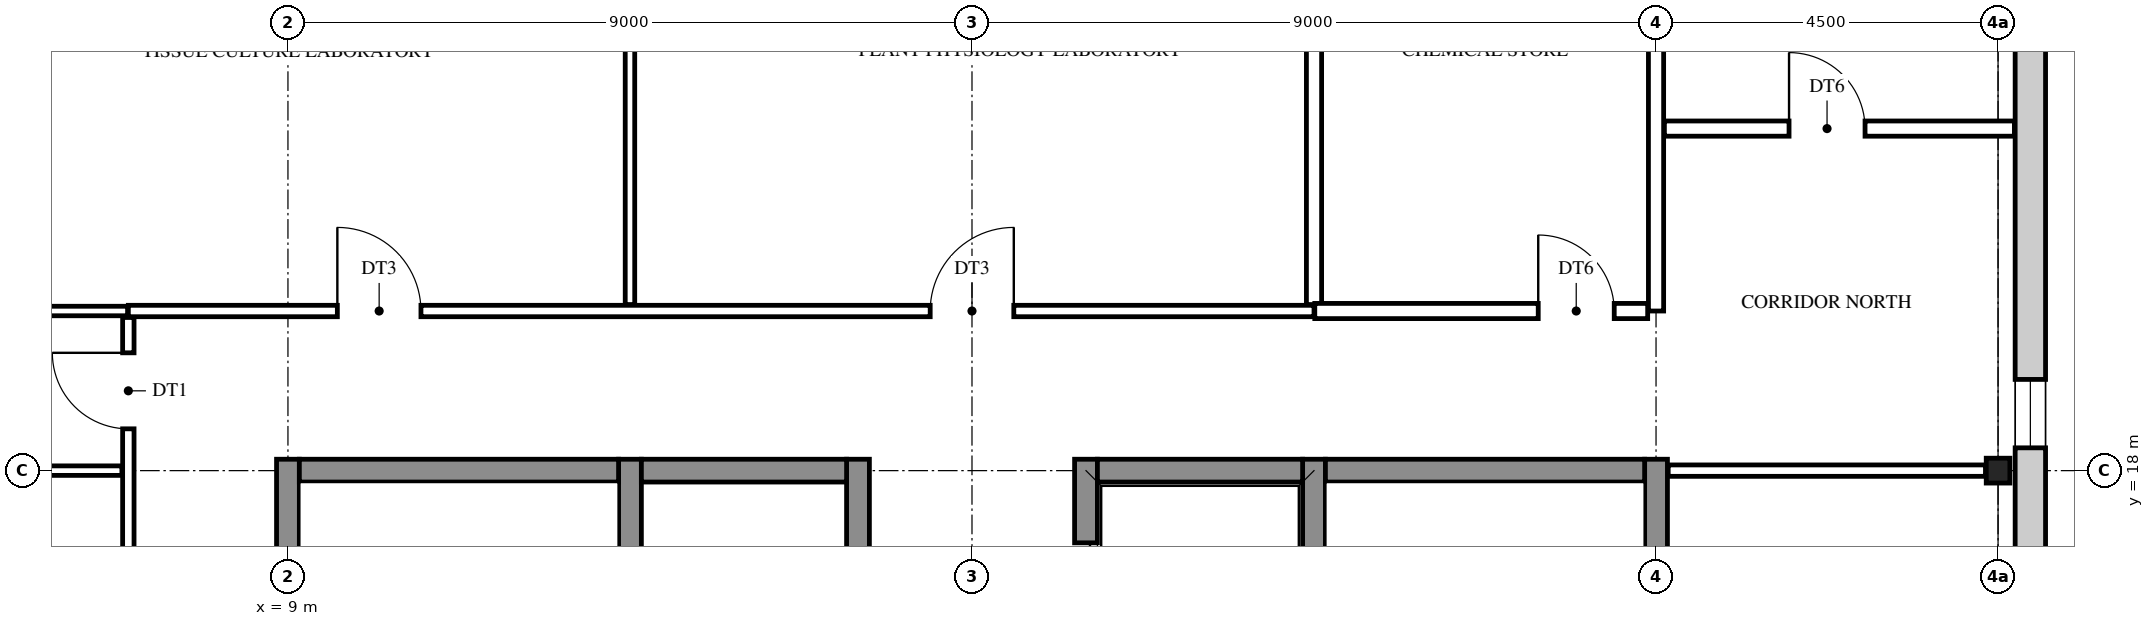
"""IFC4 building model, lengths in metres.
Left out: names, types, materials, properties, quantities, classifications, styles, units other than length and angle.
Written with IfcOpenShell. Run it as: python <this file> out.ifc"""

import sys

from ifc_helpers import new_model, si_unit, direction, frame, frame_2d, origin, origin_2d, place, context, subcontext, project, spatial, rectangle, i_section, extrude, element, fill, save


model = new_model("IFC4")
c1 = context("Model", 3, precision=1e-05, world=origin(), true_north=direction((0.0, 1.0)))
c2 = subcontext(c1, "Body", "Model", "MODEL_VIEW")
j1 = project(units=[si_unit("LENGTHUNIT", "METRE"), si_unit("PLANEANGLEUNIT", "RADIAN")], contexts=[c1])
p1 = place(None, origin())
s1 = spatial("IfcSite", under=j1, at=p1, CompositionType="ELEMENT")
p2 = place(p1, origin())
s2 = spatial("IfcBuilding", under=s1, at=p2, CompositionType="ELEMENT")
p3 = place(p2, frame((0.0, 0.0, 31.8)))
s3 = spatial("IfcBuildingStorey", under=s2, at=p3, CompositionType="ELEMENT", Elevation=31.8)
p4 = place(p3, frame((31.5, 18.0, 0.0), z_axis=(0.0, 0.0, 1.0), x_axis=(1.0, 0.0, 0.0)))
e1 = element("IfcColumn", 1, at=p4, inside=s3, PredefinedType="COLUMN", context=c2, shape_type="SweptSolid", body=[
    extrude(i_section(OverallWidth=0.311, OverallDepth=0.327, WebThickness=0.016, FlangeThickness=0.025, FilletRadius=0.017, at=origin_2d()), origin(), (0.0, 0.0, 1.0), 4.2),
])
for number, where, z_axis, x_axis in (
    (2, (9.0, 8.85, 0.0), (0.0, 0.0, 1.0), (0.0, 1.0, 0.0)),
    (3, (13.5, 8.85, 0.0), (0.0, 0.0, 1.0), (0.0, 1.0, 0.0)),
):
    element("IfcWall", number, at=place(p3, frame(where, z_axis=z_axis, x_axis=x_axis)), inside=s3, PredefinedType="SHEAR", context=c2, shape_type="SweptSolid", body=[
        extrude(rectangle(XDim=9.3, YDim=0.3, at=frame_2d((4.65, 0.0))), origin(), (0.0, 0.0, 1.0), 4.2),
    ])
p5 = place(p3, frame((16.5, 8.85, 0.0), z_axis=(0.0, 0.0, 1.0), x_axis=(0.0, 1.0, 0.0)))
e4 = element("IfcWall", 4, at=p5, inside=s3, PredefinedType="SHEAR", context=c2, shape_type="SweptSolid", body=[
    extrude(rectangle(XDim=9.3, YDim=0.3, at=frame_2d((4.65, 0.0))), origin(), (0.0, 0.0, 1.0), 4.2),
])
p6 = place(p5, frame((1.1, 0.0, 0.0)))
e5 = element("IfcOpeningElement", 5, at=p6, cuts=e4, PredefinedType="OPENING", context=c2, shape_type="SweptSolid", body=[
    extrude(rectangle(XDim=1.1, YDim=2.1, at=frame_2d((0.55, 1.05))), frame((0.0, 0.16, 0.0), z_axis=(0.0, -1.0, 0.0), x_axis=(1.0, 0.0, 0.0)), (0.0, 0.0, 1.0), 0.32),
])
p7 = place(p5, frame((4.1, 0.0, 0.0)))
e6 = element("IfcOpeningElement", 6, at=p7, cuts=e4, PredefinedType="OPENING", context=c2, shape_type="SweptSolid", body=[
    extrude(rectangle(XDim=1.1, YDim=2.1, at=frame_2d((0.55, 1.05))), frame((0.0, 0.16, 0.0), z_axis=(0.0, -1.0, 0.0), x_axis=(1.0, 0.0, 0.0)), (0.0, 0.0, 1.0), 0.32),
])
p8 = place(p3, frame((19.5, 8.85, 0.0), z_axis=(0.0, 0.0, 1.0), x_axis=(0.0, 1.0, 0.0)))
e7 = element("IfcWall", 7, at=p8, inside=s3, PredefinedType="SHEAR", context=c2, shape_type="SweptSolid", body=[
    extrude(rectangle(XDim=9.3, YDim=0.3, at=frame_2d((4.65, 0.0))), origin(), (0.0, 0.0, 1.0), 4.2),
])
p9 = place(p8, frame((3.95, 0.0, 0.0)))
e8 = element("IfcOpeningElement", 8, at=p9, cuts=e7, PredefinedType="OPENING", context=c2, shape_type="SweptSolid", body=[
    extrude(rectangle(XDim=1.4, YDim=2.1, at=frame_2d((0.7, 1.05))), frame((0.0, 0.16, 0.0), z_axis=(0.0, -1.0, 0.0), x_axis=(1.0, 0.0, 0.0)), (0.0, 0.0, 1.0), 0.32),
])
p10 = place(p8, frame((7.1, 0.0, 0.0)))
e9 = element("IfcOpeningElement", 9, at=p10, cuts=e7, PredefinedType="OPENING", context=c2, shape_type="SweptSolid", body=[
    extrude(rectangle(XDim=1.1, YDim=2.1, at=frame_2d((0.55, 1.05))), frame((0.0, 0.16, 0.0), z_axis=(0.0, -1.0, 0.0), x_axis=(1.0, 0.0, 0.0)), (0.0, 0.0, 1.0), 0.32),
])
for number, where, z_axis, x_axis in (
    (10, (22.5, 8.85, 0.0), (0.0, 0.0, 1.0), (0.0, 1.0, 0.0)),
    (11, (27.0, 8.85, 0.0), (0.0, 0.0, 1.0), (0.0, 1.0, 0.0)),
):
    element("IfcWall", number, at=place(p3, frame(where, z_axis=z_axis, x_axis=x_axis)), inside=s3, PredefinedType="SHEAR", context=c2, shape_type="SweptSolid", body=[
        extrude(rectangle(XDim=9.3, YDim=0.3, at=frame_2d((4.65, 0.0))), origin(), (0.0, 0.0, 1.0), 4.2),
    ])
p11 = place(p3, frame((9.15, 18.0, 0.0), z_axis=(0.0, 0.0, 1.0), x_axis=(1.0, 0.0, 0.0)))
e12 = element("IfcWall", 12, at=p11, inside=s3, PredefinedType="SHEAR", context=c2, shape_type="SweptSolid", body=[
    extrude(rectangle(XDim=4.2, YDim=0.3, at=frame_2d((2.1, 0.0))), origin(), (0.0, 0.0, 1.0), 4.2),
])
for number, where, z_axis, x_axis in (
    (13, (13.65, 18.0, 0.0), (0.0, 0.0, 1.0), (1.0, 0.0, 0.0)),
    (14, (19.65, 18.0, 0.0), (0.0, 0.0, 1.0), (1.0, 0.0, 0.0)),
):
    element("IfcWall", number, at=place(p3, frame(where, z_axis=z_axis, x_axis=x_axis)), inside=s3, PredefinedType="SHEAR", context=c2, shape_type="SweptSolid", body=[
        extrude(rectangle(XDim=2.7, YDim=0.3, at=frame_2d((1.35, 0.0))), origin(), (0.0, 0.0, 1.0), 4.2),
    ])
p12 = place(p3, frame((22.65, 18.0, 0.0), z_axis=(0.0, 0.0, 1.0), x_axis=(1.0, 0.0, 0.0)))
e15 = element("IfcWall", 15, at=p12, inside=s3, PredefinedType="SHEAR", context=c2, shape_type="SweptSolid", body=[
    extrude(rectangle(XDim=4.2, YDim=0.3, at=frame_2d((2.1, 0.0))), origin(), (0.0, 0.0, 1.0), 4.2),
])
p13 = place(p3, frame((31.925, 27.225, 0.0), z_axis=(0.0, 0.0, 1.0), x_axis=(0.0, -1.0, 0.0)))
e16 = element("IfcWall", 16, at=p13, inside=s3, PredefinedType="STANDARD", context=c2, shape_type="SweptSolid", body=[
    extrude(rectangle(XDim=27.45, YDim=0.4, at=frame_2d((13.725, 0.0))), origin(), (0.0, 0.0, 1.0), 4.2),
])
p14 = place(p13, frame((26.025, 0.0, 0.9)))
e17 = element("IfcOpeningElement", 17, at=p14, cuts=e16, PredefinedType="OPENING", context=c2, shape_type="SweptSolid", body=[
    extrude(rectangle(XDim=0.9, YDim=2.0, at=frame_2d((0.45, 1.0))), frame((0.0, 0.21, 0.0), z_axis=(0.0, -1.0, 0.0), x_axis=(1.0, 0.0, 0.0)), (0.0, 0.0, 1.0), 0.42),
])
p15 = place(p13, frame((18.525, 0.0, 0.9)))
e18 = element("IfcOpeningElement", 18, at=p15, cuts=e16, PredefinedType="OPENING", context=c2, shape_type="SweptSolid", body=[
    extrude(rectangle(XDim=0.9, YDim=2.0, at=frame_2d((0.45, 1.0))), frame((0.0, 0.21, 0.0), z_axis=(0.0, -1.0, 0.0), x_axis=(1.0, 0.0, 0.0)), (0.0, 0.0, 1.0), 0.42),
])
p16 = place(p13, frame((15.675, 0.0, 1.6)))
e19 = element("IfcOpeningElement", 19, at=p16, cuts=e16, PredefinedType="OPENING", context=c2, shape_type="SweptSolid", body=[
    extrude(rectangle(XDim=0.6, YDim=0.9, at=frame_2d((0.3, 0.45))), frame((0.0, 0.21, 0.0), z_axis=(0.0, -1.0, 0.0), x_axis=(1.0, 0.0, 0.0)), (0.0, 0.0, 1.0), 0.42),
])
p17 = place(p13, frame((11.175, 0.0, 1.6)))
e20 = element("IfcOpeningElement", 20, at=p17, cuts=e16, PredefinedType="OPENING", context=c2, shape_type="SweptSolid", body=[
    extrude(rectangle(XDim=0.6, YDim=0.9, at=frame_2d((0.3, 0.45))), frame((0.0, 0.21, 0.0), z_axis=(0.0, -1.0, 0.0), x_axis=(1.0, 0.0, 0.0)), (0.0, 0.0, 1.0), 0.42),
])
p18 = place(p13, frame((8.025, 0.0, 0.9)))
e21 = element("IfcOpeningElement", 21, at=p18, cuts=e16, PredefinedType="OPENING", context=c2, shape_type="SweptSolid", body=[
    extrude(rectangle(XDim=0.9, YDim=2.0, at=frame_2d((0.45, 1.0))), frame((0.0, 0.21, 0.0), z_axis=(0.0, -1.0, 0.0), x_axis=(1.0, 0.0, 0.0)), (0.0, 0.0, 1.0), 0.42),
])
p19 = place(p13, frame((0.525, 0.0, 0.9)))
e22 = element("IfcOpeningElement", 22, at=p19, cuts=e16, PredefinedType="OPENING", context=c2, shape_type="SweptSolid", body=[
    extrude(rectangle(XDim=0.9, YDim=2.0, at=frame_2d((0.45, 1.0))), frame((0.0, 0.21, 0.0), z_axis=(0.0, -1.0, 0.0), x_axis=(1.0, 0.0, 0.0)), (0.0, 0.0, 1.0), 0.42),
])
p20 = place(p3, frame((6.9, 6.985, 0.0), z_axis=(0.0, 0.0, 1.0), x_axis=(0.0, 1.0, 0.0)))
e23 = element("IfcWall", 23, at=p20, inside=s3, PredefinedType="PARTITIONING", context=c2, shape_type="SweptSolid", body=[
    extrude(rectangle(XDim=13.03, YDim=0.15, at=frame_2d((6.515, 0.0))), origin(), (0.0, 0.0, 1.0), 3.537),
])
p21 = place(p20, frame((11.565, 0.0, 0.0)))
e24 = element("IfcOpeningElement", 24, at=p21, cuts=e23, PredefinedType="OPENING", context=c2, shape_type="SweptSolid", body=[
    extrude(rectangle(XDim=1.0, YDim=2.1, at=frame_2d((0.5, 1.05))), frame((0.0, 0.085, 0.0), z_axis=(0.0, -1.0, 0.0), x_axis=(1.0, 0.0, 0.0)), (0.0, 0.0, 1.0), 0.17),
])
p22 = place(p20, frame((5.965, 0.0, 0.0)))
e25 = element("IfcOpeningElement", 25, at=p22, cuts=e23, PredefinedType="OPENING", context=c2, shape_type="SweptSolid", body=[
    extrude(rectangle(XDim=1.1, YDim=2.1, at=frame_2d((0.55, 1.05))), frame((0.0, 0.085, 0.0), z_axis=(0.0, -1.0, 0.0), x_axis=(1.0, 0.0, 0.0)), (0.0, 0.0, 1.0), 0.17),
])
p23 = place(p3, frame((13.5, 20.185, 0.0), z_axis=(0.0, 0.0, 1.0), x_axis=(0.0, 1.0, 0.0)))
e26 = element("IfcWall", 26, at=p23, inside=s3, PredefinedType="PARTITIONING", context=c2, shape_type="SweptSolid", body=[
    extrude(rectangle(XDim=7.041, YDim=0.125, at=frame_2d((3.521, 0.0))), origin(), (0.0, 0.0, 1.0), 3.537),
])
p24 = place(p3, frame((22.5, 20.185, 0.0), z_axis=(0.0, 0.0, 1.0), x_axis=(0.0, 1.0, 0.0)))
e27 = element("IfcWall", 27, at=p24, inside=s3, PredefinedType="PARTITIONING", context=c2, shape_type="SweptSolid", body=[
    extrude(rectangle(XDim=7.041, YDim=0.2, at=frame_2d((3.521, 0.0))), origin(), (0.0, 0.0, 1.0), 3.537),
])
p25 = place(p3, frame((27.0, 20.1, 0.0), z_axis=(0.0, 0.0, 1.0), x_axis=(0.0, 1.0, 0.0)))
e28 = element("IfcWall", 28, at=p25, inside=s3, PredefinedType="PARTITIONING", context=c2, shape_type="SweptSolid", body=[
    extrude(rectangle(XDim=6.726, YDim=0.2, at=frame_2d((3.363, 0.0))), origin(), (0.0, 0.0, 1.0), 3.537),
])
p26 = place(p3, frame((0.166, 18.0, 0.0), z_axis=(0.0, 0.0, 1.0), x_axis=(1.0, 0.0, 0.0)))
e29 = element("IfcWall", 29, at=p26, inside=s3, PredefinedType="PARTITIONING", context=c2, shape_type="SweptSolid", body=[
    extrude(rectangle(XDim=6.649, YDim=0.125, at=frame_2d((3.325, 0.0))), origin(), (0.0, 0.0, 1.0), 3.537),
])
p27 = place(p3, frame((27.16, 18.0, 0.0), z_axis=(0.0, 0.0, 1.0), x_axis=(1.0, 0.0, 0.0)))
e30 = element("IfcWall", 30, at=p27, inside=s3, PredefinedType="PARTITIONING", context=c2, shape_type="SweptSolid", body=[
    extrude(rectangle(XDim=4.175, YDim=0.15, at=frame_2d((2.087, 0.0))), origin(), (0.0, 0.0, 1.0), 3.537),
])
p28 = place(p3, frame((4.573, 20.1, 0.0), z_axis=(0.0, 0.0, 1.0), x_axis=(1.0, 0.0, 0.0)))
e31 = element("IfcWall", 31, at=p28, inside=s3, PredefinedType="PARTITIONING", context=c2, shape_type="SweptSolid", body=[
    extrude(rectangle(XDim=2.317, YDim=0.125, at=frame_2d((1.159, 0.0))), origin(), (0.0, 0.0, 1.0), 3.537),
])
p29 = place(p3, frame((6.9, 20.1, 0.0), z_axis=(0.0, 0.0, 1.0), x_axis=(1.0, 0.0, 0.0)))
e32 = element("IfcWall", 32, at=p29, inside=s3, PredefinedType="PARTITIONING", context=c2, shape_type="SweptSolid", body=[
    extrude(rectangle(XDim=15.6, YDim=0.15, at=frame_2d((7.8, 0.0))), origin(), (0.0, 0.0, 1.0), 3.537),
])
p30 = place(p29, frame((2.75, 0.0, 0.0)))
e33 = element("IfcOpeningElement", 33, at=p30, cuts=e32, PredefinedType="OPENING", context=c2, shape_type="SweptSolid", body=[
    extrude(rectangle(XDim=1.1, YDim=2.1, at=frame_2d((0.55, 1.05))), frame((0.0, 0.085, 0.0), z_axis=(0.0, -1.0, 0.0), x_axis=(1.0, 0.0, 0.0)), (0.0, 0.0, 1.0), 0.17),
])
p31 = place(p29, frame((10.55, 0.0, 0.0)))
e34 = element("IfcOpeningElement", 34, at=p31, cuts=e32, PredefinedType="OPENING", context=c2, shape_type="SweptSolid", body=[
    extrude(rectangle(XDim=1.1, YDim=2.1, at=frame_2d((0.55, 1.05))), frame((0.0, 0.085, 0.0), z_axis=(0.0, -1.0, 0.0), x_axis=(1.0, 0.0, 0.0)), (0.0, 0.0, 1.0), 0.17),
])
p32 = place(p3, frame((22.51, 20.1, 0.0), z_axis=(0.0, 0.0, 1.0), x_axis=(1.0, 0.0, 0.0)))
e35 = element("IfcWall", 35, at=p32, inside=s3, PredefinedType="PARTITIONING", context=c2, shape_type="SweptSolid", body=[
    extrude(rectangle(XDim=4.38, YDim=0.2, at=frame_2d((2.19, 0.0))), origin(), (0.0, 0.0, 1.0), 3.537),
])
p33 = place(p32, frame((2.94, 0.0, 0.0)))
e36 = element("IfcOpeningElement", 36, at=p33, cuts=e35, PredefinedType="OPENING", context=c2, shape_type="SweptSolid", body=[
    extrude(rectangle(XDim=1.0, YDim=2.1, at=frame_2d((0.5, 1.05))), frame((0.0, 0.11, 0.0), z_axis=(0.0, -1.0, 0.0), x_axis=(1.0, 0.0, 0.0)), (0.0, 0.0, 1.0), 0.22),
])
p34 = place(p3, frame((27.11, 22.5, 0.0), z_axis=(0.0, 0.0, 1.0), x_axis=(1.0, 0.0, 0.0)))
e37 = element("IfcWall", 37, at=p34, inside=s3, PredefinedType="PARTITIONING", context=c2, shape_type="SweptSolid", body=[
    extrude(rectangle(XDim=4.605, YDim=0.2, at=frame_2d((2.302, 0.0))), origin(), (0.0, 0.0, 1.0), 3.537),
])
p35 = place(p34, frame((1.64, 0.0, 0.0)))
e38 = element("IfcOpeningElement", 38, at=p35, cuts=e37, PredefinedType="OPENING", context=c2, shape_type="SweptSolid", body=[
    extrude(rectangle(XDim=1.0, YDim=2.1, at=frame_2d((0.5, 1.05))), frame((0.0, 0.11, 0.0), z_axis=(0.0, -1.0, 0.0), x_axis=(1.0, 0.0, 0.0)), (0.0, 0.0, 1.0), 0.22),
])
p36 = place(p18, origin())
e39 = element("IfcWindow", 39, at=p36, inside=s3, PartitioningType="SINGLE_PANEL", PredefinedType="WINDOW", context=c2, shape_type="SweptSolid", body=[
    extrude(rectangle(XDim=0.9, YDim=2.0, at=frame_2d((0.45, 1.0))), frame((0.0, 0.03, 0.0), z_axis=(0.0, -1.0, 0.0), x_axis=(1.0, 0.0, 0.0)), (0.0, 0.0, 1.0), 0.06),
])
fill(e21, e39)
p37 = place(p21, origin())
e40 = element("IfcDoor", 40, at=p37, inside=s3, OperationType="SINGLE_SWING_RIGHT", PredefinedType="DOOR", context=c2, shape_type="SweptSolid", body=[
    extrude(rectangle(XDim=1.0, YDim=2.1, at=frame_2d((0.5, 1.05))), frame((0.0, 0.025, 0.0), z_axis=(0.0, -1.0, 0.0), x_axis=(1.0, 0.0, 0.0)), (0.0, 0.0, 1.0), 0.05),
])
fill(e24, e40)
p38 = place(p30, origin())
e41 = element("IfcDoor", 41, at=p38, inside=s3, OperationType="SINGLE_SWING_LEFT", PredefinedType="DOOR", context=c2, shape_type="SweptSolid", body=[
    extrude(rectangle(XDim=1.1, YDim=2.1, at=frame_2d((0.55, 1.05))), frame((0.0, 0.025, 0.0), z_axis=(0.0, -1.0, 0.0), x_axis=(1.0, 0.0, 0.0)), (0.0, 0.0, 1.0), 0.05),
])
fill(e33, e41)
p39 = place(p31, origin())
e42 = element("IfcDoor", 42, at=p39, inside=s3, OperationType="SINGLE_SWING_RIGHT", PredefinedType="DOOR", context=c2, shape_type="SweptSolid", body=[
    extrude(rectangle(XDim=1.1, YDim=2.1, at=frame_2d((0.55, 1.05))), frame((0.0, 0.025, 0.0), z_axis=(0.0, -1.0, 0.0), x_axis=(1.0, 0.0, 0.0)), (0.0, 0.0, 1.0), 0.05),
])
fill(e34, e42)
p40 = place(p33, origin())
e43 = element("IfcDoor", 43, at=p40, inside=s3, OperationType="SINGLE_SWING_LEFT", PredefinedType="DOOR", context=c2, shape_type="SweptSolid", body=[
    extrude(rectangle(XDim=1.0, YDim=2.1, at=frame_2d((0.5, 1.05))), frame((0.0, 0.025, 0.0), z_axis=(0.0, -1.0, 0.0), x_axis=(1.0, 0.0, 0.0)), (0.0, 0.0, 1.0), 0.05),
])
fill(e36, e43)
p41 = place(p35, origin())
e44 = element("IfcDoor", 44, at=p41, inside=s3, OperationType="SINGLE_SWING_LEFT", PredefinedType="DOOR", context=c2, shape_type="SweptSolid", body=[
    extrude(rectangle(XDim=1.0, YDim=2.1, at=frame_2d((0.5, 1.05))), frame((0.0, 0.025, 0.0), z_axis=(0.0, -1.0, 0.0), x_axis=(1.0, 0.0, 0.0)), (0.0, 0.0, 1.0), 0.05),
])
fill(e38, e44)
p42 = place(p10, origin())
e45 = element("IfcDoor", 45, at=p42, inside=s3, OperationType="DOUBLE_DOOR_SLIDING", PredefinedType="DOOR", context=c2, shape_type="SweptSolid", body=[
    extrude(rectangle(XDim=1.1, YDim=2.1, at=frame_2d((0.55, 1.05))), frame((0.0, 0.025, 0.0), z_axis=(0.0, -1.0, 0.0), x_axis=(1.0, 0.0, 0.0)), (0.0, 0.0, 1.0), 0.05),
])
fill(e9, e45)
save(model, sys.argv[1])
